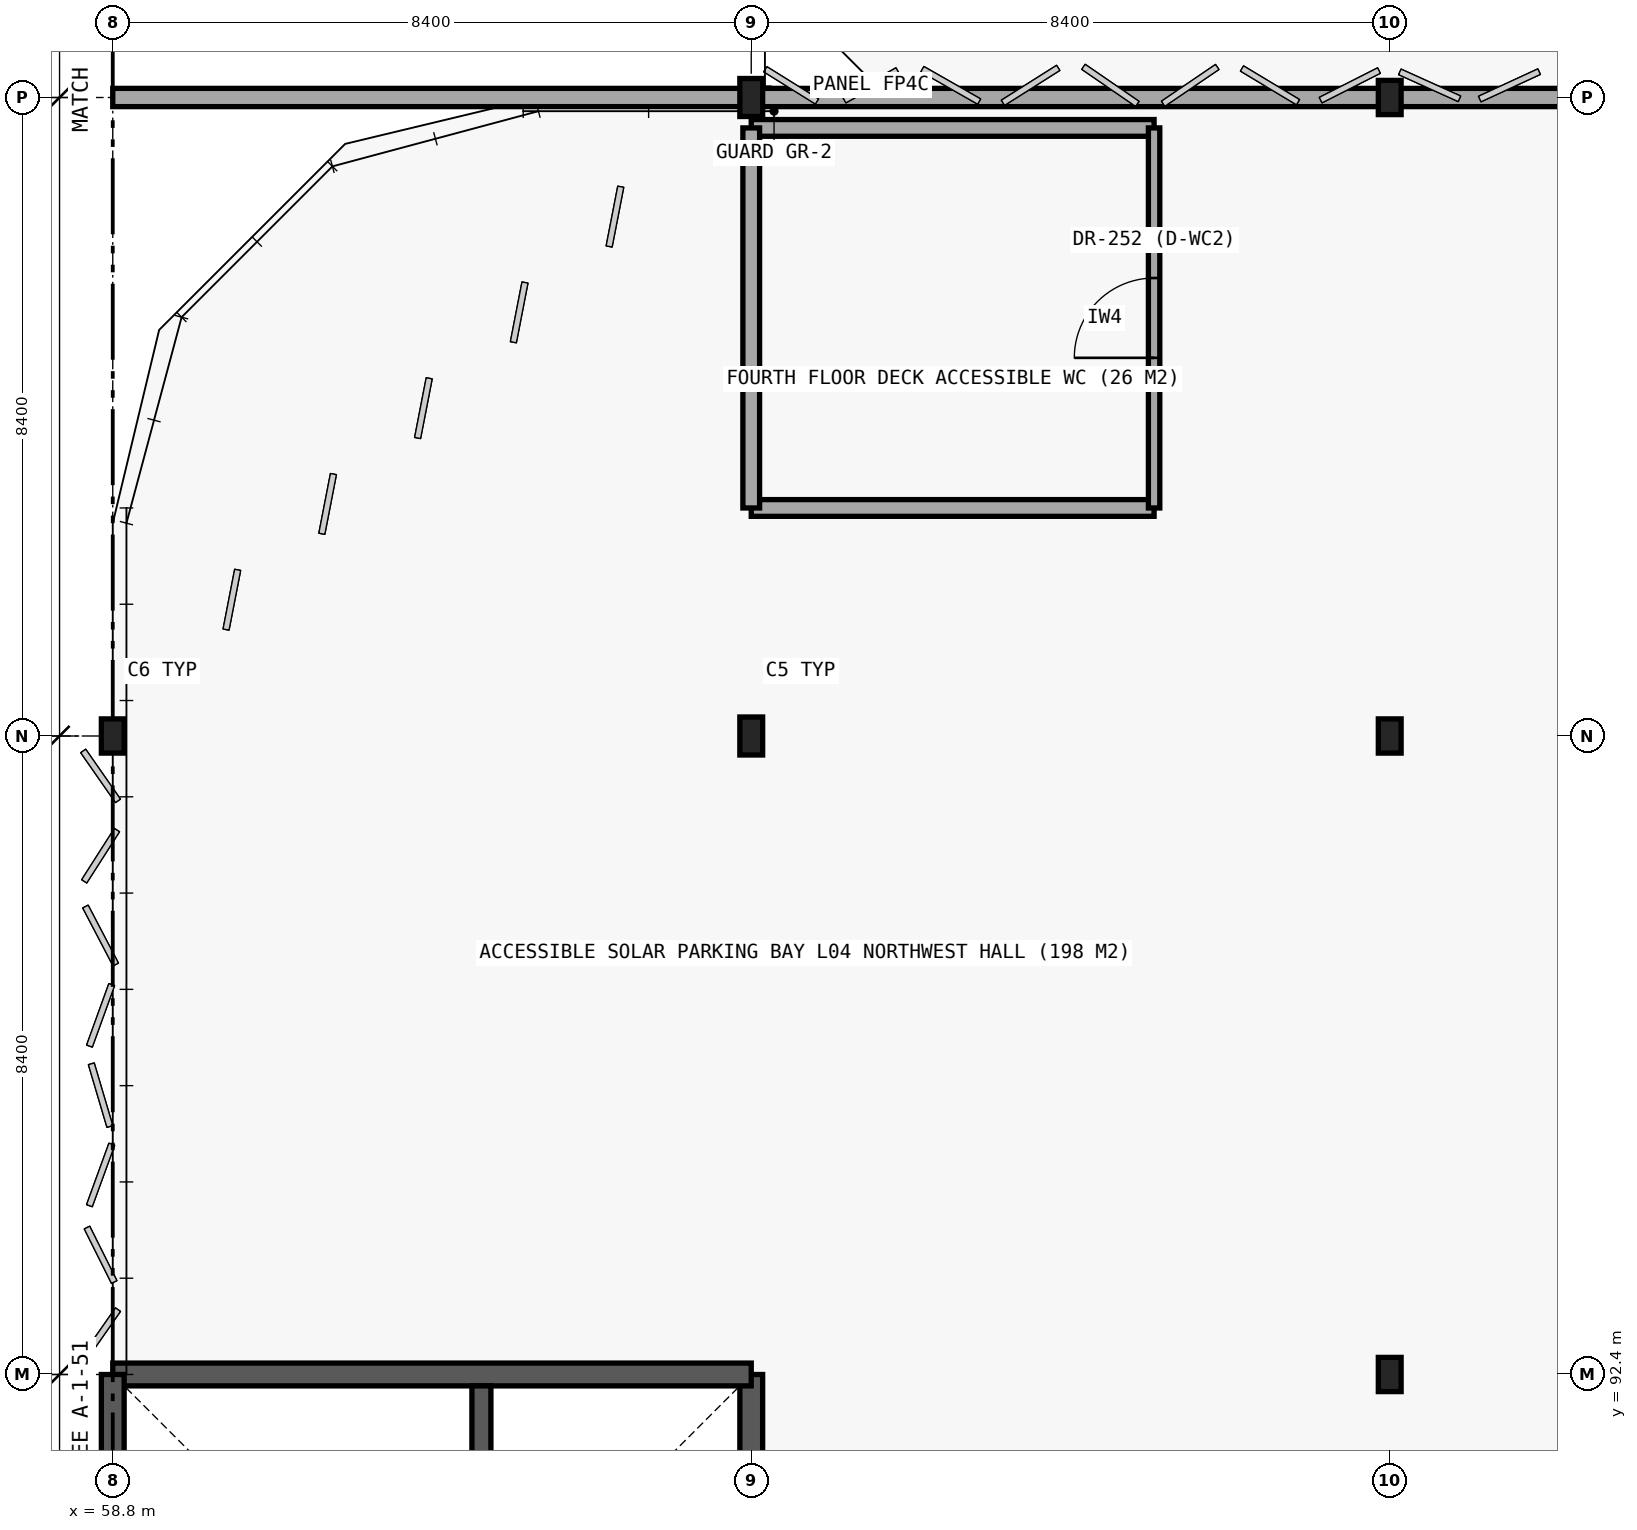
"""IFC4 building model, lengths in metres.
Left out: names, types, materials, properties, quantities, classifications, styles, units other than length and angle.
Written with IfcOpenShell. Run it as: python <this file> out.ifc"""

import sys

from ifc_helpers import new_model, si_unit, direction, frame, frame_2d, origin, origin_2d, place, context, subcontext, project, spatial, rectangle, i_section, extrude, element, fill, save


model = new_model("IFC4")
c1 = context("Model", 3, precision=1e-05, world=origin(), true_north=direction((0.0, 1.0)))
c2 = subcontext(c1, "Body", "Model", "MODEL_VIEW")
j1 = project(units=[si_unit("LENGTHUNIT", "METRE"), si_unit("PLANEANGLEUNIT", "RADIAN")], contexts=[c1])
p1 = place(None, origin())
s1 = spatial("IfcSite", under=j1, at=p1, CompositionType="ELEMENT")
p2 = place(p1, origin())
s2 = spatial("IfcBuilding", under=s1, at=p2, CompositionType="ELEMENT")
p3 = place(p2, frame((0.0, 0.0, 17.4)))
s3 = spatial("IfcBuildingStorey", under=s2, at=p3, CompositionType="ELEMENT", Elevation=17.4)
p4 = place(p3, frame((67.2, 84.0, 0.0), z_axis=(0.0, 0.0, 1.0), x_axis=(0.0, 1.0, 0.0)))
e1 = element("IfcWall", 1, at=p4, inside=s3, PredefinedType="SHEAR", context=c2, shape_type="SweptSolid", body=[
    extrude(rectangle(XDim=8.4, YDim=0.3, at=frame_2d((4.2, 0.0))), origin(), (0.0, 0.0, 1.0), 4.2),
])
p5 = place(p4, frame((4.55, 0.0, 0.0)))
e2 = element("IfcOpeningElement", 2, at=p5, cuts=e1, PredefinedType="OPENING", context=c2, shape_type="SweptSolid", body=[
    extrude(rectangle(XDim=1.1, YDim=2.2, at=frame_2d((0.55, 1.1))), frame((0.0, 0.16, 0.0), z_axis=(0.0, -1.0, 0.0), x_axis=(1.0, 0.0, 0.0)), (0.0, 0.0, 1.0), 0.32),
])
for number, where, z_axis, x_axis in (
    (3, (67.2, 92.4, 0.0), (0.0, 0.0, 1.0), (-1.0, 0.0, 0.0)),
    (4, (58.8, 92.4, 0.0), (0.0, 0.0, 1.0), (0.0, -1.0, 0.0)),
):
    element("IfcWall", number, at=place(p3, frame(where, z_axis=z_axis, x_axis=x_axis)), inside=s3, PredefinedType="SHEAR", context=c2, shape_type="SweptSolid", body=[
        extrude(rectangle(XDim=8.4, YDim=0.3, at=frame_2d((4.2, 0.0))), origin(), (0.0, 0.0, 1.0), 4.2),
    ])
p6 = place(p3, frame((63.65, 84.15, 0.0), z_axis=(0.0, 0.0, 1.0), x_axis=(0.0, 1.0, 0.0)))
e5 = element("IfcWall", 5, at=p6, inside=s3, PredefinedType="SHEAR", context=c2, shape_type="SweptSolid", body=[
    extrude(rectangle(XDim=8.1, YDim=0.25, at=frame_2d((4.05, 0.0))), origin(), (0.0, 0.0, 1.0), 4.2),
])
p7 = place(p3, frame((58.8, 100.8, 0.0), z_axis=(0.0, 0.0, 1.0), x_axis=(1.0, 0.0, 0.0)))
e6 = element("IfcColumn", 6, at=p7, inside=s3, PredefinedType="COLUMN", context=c2, shape_type="SweptSolid", body=[
    extrude(i_section(OverallWidth=0.3, OverallDepth=0.45, WebThickness=0.014, FlangeThickness=0.026, FilletRadius=0.027, at=origin_2d()), origin(), (0.0, 0.0, 1.0), 3.71),
])
for number, where, z_axis, x_axis in (
    (7, (67.2, 100.8, 0.0), (0.0, 0.0, 1.0), (1.0, 0.0, 0.0)),
    (8, (67.2, 109.2, 0.0), (0.0, 0.0, 1.0), (1.0, 0.0, 0.0)),
):
    element("IfcColumn", number, at=place(p3, frame(where, z_axis=z_axis, x_axis=x_axis)), inside=s3, PredefinedType="COLUMN", context=c2, shape_type="SweptSolid", body=[
        extrude(i_section(OverallWidth=0.3, OverallDepth=0.5, WebThickness=0.014, FlangeThickness=0.028, FilletRadius=0.027, at=origin_2d()), origin(), (0.0, 0.0, 1.0), 3.71),
    ])
for number, where, z_axis, x_axis in (
    (9, (75.6, 92.4, 0.0), (0.0, 0.0, 1.0), (1.0, 0.0, 0.0)),
    (10, (75.6, 100.8, 0.0), (0.0, 0.0, 1.0), (1.0, 0.0, 0.0)),
    (11, (75.6, 109.2, 0.0), (0.0, 0.0, 1.0), (1.0, 0.0, 0.0)),
):
    element("IfcColumn", number, at=place(p3, frame(where, z_axis=z_axis, x_axis=x_axis)), inside=s3, PredefinedType="COLUMN", context=c2, shape_type="SweptSolid", body=[
        extrude(i_section(OverallWidth=0.3, OverallDepth=0.45, WebThickness=0.014, FlangeThickness=0.026, FilletRadius=0.027, at=origin_2d()), origin(), (0.0, 0.0, 1.0), 3.71),
    ])
p8 = place(p3, frame((58.8, 109.2, 3.9), z_axis=(0.0, 0.0, 1.0), x_axis=(1.0, 0.0, 0.0)))
e12 = element("IfcWall", 12, at=p8, inside=s3, PredefinedType="PARAPET", context=c2, shape_type="SweptSolid", body=[
    extrude(rectangle(XDim=42.0, YDim=0.24, at=frame_2d((21.0, 0.0))), origin(), (0.0, 0.0, 1.0), 0.95),
])
for number, where, z_axis, x_axis in (
    (13, (67.2, 103.8, 0.0), (0.0, 0.0, 1.0), (1.0, 0.0, 0.0)),
    (14, (67.2, 108.8, 0.0), (0.0, 0.0, 1.0), (1.0, 0.0, 0.0)),
):
    element("IfcWall", number, at=place(p3, frame(where, z_axis=z_axis, x_axis=x_axis)), inside=s3, PredefinedType="PARTITIONING", context=c2, shape_type="SweptSolid", body=[
        extrude(rectangle(XDim=5.3, YDim=0.22, at=frame_2d((2.65, 0.0))), origin(), (0.0, 0.0, 1.0), 3.5),
    ])
p9 = place(p3, frame((67.2, 103.8, 0.0), z_axis=(0.0, 0.0, 1.0), x_axis=(0.0, 1.0, 0.0)))
e15 = element("IfcWall", 15, at=p9, inside=s3, PredefinedType="PARTITIONING", context=c2, shape_type="SweptSolid", body=[
    extrude(rectangle(XDim=5.0, YDim=0.22, at=frame_2d((2.5, 0.0))), origin(), (0.0, 0.0, 1.0), 3.19),
])
p10 = place(p3, frame((72.5, 103.8, 0.0), z_axis=(0.0, 0.0, 1.0), x_axis=(0.0, 1.0, 0.0)))
e16 = element("IfcWall", 16, at=p10, inside=s3, PredefinedType="PARTITIONING", context=c2, shape_type="SweptSolid", body=[
    extrude(rectangle(XDim=5.0, YDim=0.15, at=frame_2d((2.5, 0.0))), origin(), (0.0, 0.0, 1.0), 3.5),
])
p11 = place(p10, frame((1.975, 0.0, 0.0)))
e17 = element("IfcOpeningElement", 17, at=p11, cuts=e16, PredefinedType="OPENING", context=c2, shape_type="SweptSolid", body=[
    extrude(rectangle(XDim=1.05, YDim=2.15, at=frame_2d((0.525, 1.075))), frame((0.0, 0.085, 0.0), z_axis=(0.0, -1.0, 0.0), x_axis=(1.0, 0.0, 0.0)), (0.0, 0.0, 1.0), 0.17),
])
p12 = place(p11, origin())
e18 = element("IfcDoor", 18, at=p12, inside=s3, OperationType="SINGLE_SWING_LEFT", PredefinedType="DOOR", context=c2, shape_type="SweptSolid", body=[
    extrude(rectangle(XDim=1.05, YDim=2.15, at=frame_2d((0.525, 1.075))), frame((0.0, 0.025, 0.0), z_axis=(0.0, -1.0, 0.0), x_axis=(1.0, 0.0, 0.0)), (0.0, 0.0, 1.0), 0.05),
])
fill(e17, e18)
save(model, sys.argv[1])
